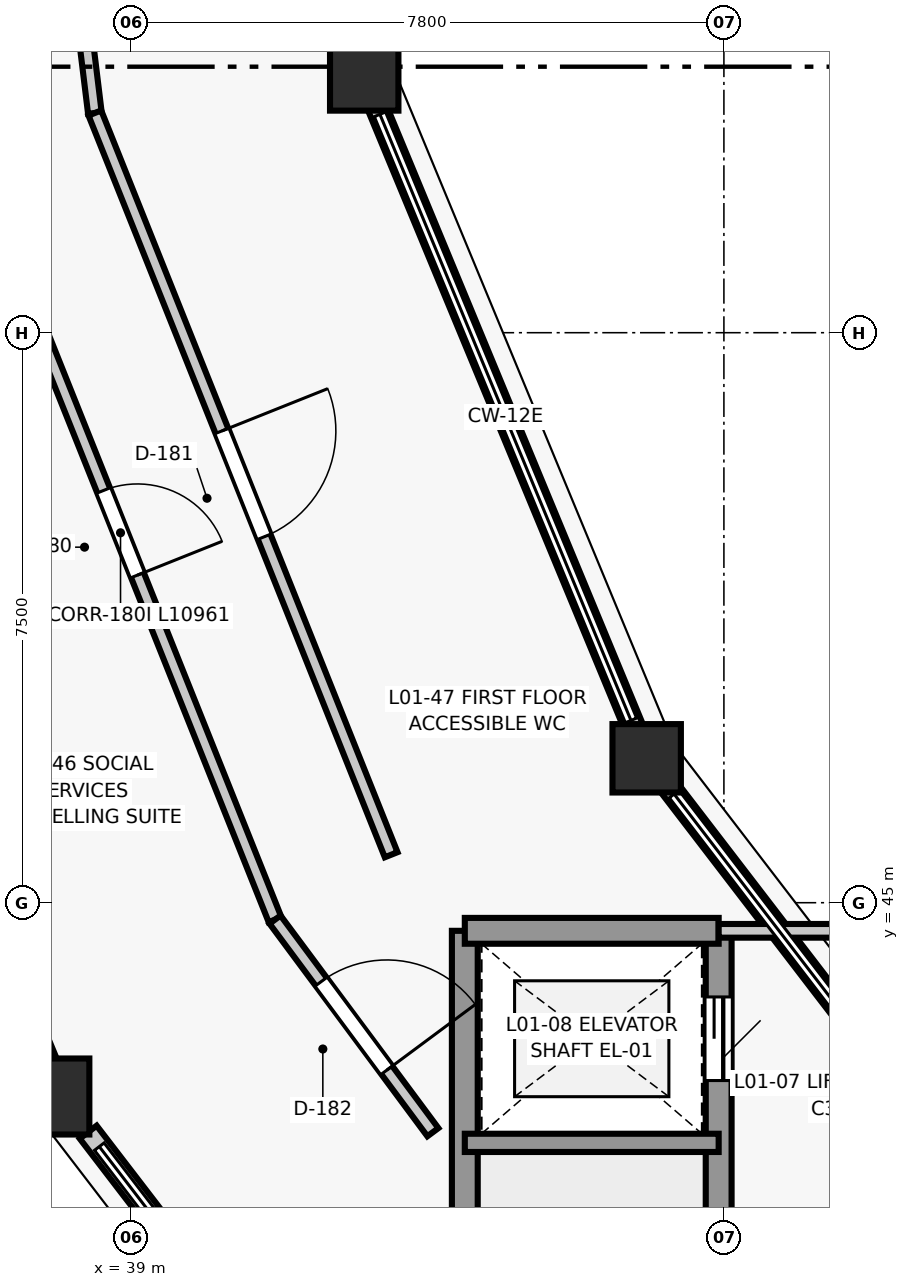
"""IFC4 building model, lengths in metres.
Left out: names, types, materials, properties, quantities, classifications, styles, units other than length and angle.
Written with IfcOpenShell. Run it as: python <this file> out.ifc"""

import sys

from ifc_helpers import new_model, si_unit, direction, frame, frame_2d, origin, origin_2d, place, context, subcontext, project, spatial, rectangle, circle, extrude, element, fill, save


model = new_model("IFC4")
c1 = context("Model", 3, precision=1e-05, world=origin(), true_north=direction((0.0, 1.0)))
c2 = subcontext(c1, "Body", "Model", "MODEL_VIEW")
j1 = project(units=[si_unit("LENGTHUNIT", "METRE"), si_unit("PLANEANGLEUNIT", "RADIAN")], contexts=[c1])
p1 = place(None, origin())
s1 = spatial("IfcSite", under=j1, at=p1, CompositionType="ELEMENT")
p2 = place(p1, origin())
s2 = spatial("IfcBuilding", under=s1, at=p2, CompositionType="ELEMENT")
p3 = place(p2, frame((0.0, 0.0, 4.5)))
s3 = spatial("IfcBuildingStorey", under=s2, at=p3, CompositionType="ELEMENT", Elevation=4.5)
for number, where, z_axis, x_axis in (
    (1, (42.068, 55.872, 0.0), (0.0, 0.0, 1.0), (1.0, 0.0, 0.0)),
    (2, (45.784, 46.9, 0.0), (0.0, 0.0, 1.0), (1.0, 0.0, 0.0)),
):
    element("IfcColumn", number, at=place(p3, frame(where, z_axis=z_axis, x_axis=x_axis)), inside=s3, PredefinedType="COLUMN", context=c2, shape_type="SweptSolid", body=[
        extrude(circle(Radius=0.45, at=origin_2d()), origin(), (0.0, 0.0, 1.0), 4.2),
    ])
p4 = place(p3, frame((38.076, 42.45, 0.0), z_axis=(0.0, 0.0, 1.0), x_axis=(1.0, 0.0, 0.0)))
e3 = element("IfcColumn", 3, at=p4, inside=s3, PredefinedType="COLUMN", context=c2, shape_type="SweptSolid", body=[
    extrude(rectangle(XDim=0.75, YDim=1.0, at=origin_2d()), origin(), (0.0, 0.0, 1.0), 4.2),
])
p5 = place(p3, frame((40.836, 65.225, 0.0), z_axis=(0.0, 0.0, 1.0), x_axis=(0.130549698469, -0.991441766434, 0.0)))
e4 = element("IfcWall", 4, at=p5, inside=s3, PredefinedType="STANDARD", context=c2, shape_type="SweptSolid", body=[
    extrude(rectangle(XDim=9.156, YDim=0.25, at=frame_2d((4.578, 0.0))), origin(), (0.0, 0.0, 1.0), 0.82),
])
p6 = place(p3, frame((37.879, 42.927, 0.0), z_axis=(0.0, 0.0, 1.0), x_axis=(-0.382695413149, 0.923874569817, 0.0)))
e5 = element("IfcWall", 5, at=p6, inside=s3, PredefinedType="STANDARD", context=c2, shape_type="SweptSolid", body=[
    extrude(rectangle(XDim=11.002, YDim=0.28, at=frame_2d((5.501, 0.0))), origin(), (0.0, 0.0, 1.0), 0.82),
])
p7 = place(p3, frame((42.182, 55.595, 0.0), z_axis=(0.0, 0.0, 1.0), x_axis=(0.382681519675, -0.923880324771, 0.0)))
e6 = element("IfcWall", 6, at=p7, inside=s3, PredefinedType="STANDARD", context=c2, shape_type="SweptSolid", body=[
    extrude(rectangle(XDim=9.112, YDim=0.25, at=frame_2d((4.556, 0.0))), origin(), (0.0, 0.0, 1.0), 0.82),
])
p8 = place(p3, frame((45.042, 33.371, 0.0), z_axis=(0.0, 0.0, 1.0), x_axis=(-0.608753590889, 0.79335935463, 0.0)))
e7 = element("IfcWall", 7, at=p8, inside=s3, PredefinedType="STANDARD", context=c2, shape_type="SweptSolid", body=[
    extrude(rectangle(XDim=10.852, YDim=0.28, at=frame_2d((5.426, 0.0))), origin(), (0.0, 0.0, 1.0), 0.82),
])
p9 = place(p3, frame((45.999, 46.62, 0.0), z_axis=(0.0, 0.0, 1.0), x_axis=(0.608769580289, -0.793347085527, 0.0)))
e8 = element("IfcWall", 8, at=p9, inside=s3, PredefinedType="STANDARD", context=c2, shape_type="SweptSolid", body=[
    extrude(rectangle(XDim=9.005, YDim=0.25, at=frame_2d((4.502, 0.0))), origin(), (0.0, 0.0, 1.0), 0.82),
])
p10 = place(p3, frame((46.731, 44.63, 0.0), z_axis=(0.0, 0.0, 1.0), x_axis=(0.0, -1.0, 0.0)))
e9 = element("IfcWall", 9, at=p10, inside=s3, PredefinedType="SHEAR", context=c2, shape_type="SweptSolid", body=[
    extrude(rectangle(XDim=9.73, YDim=0.34, at=frame_2d((4.865, 0.0))), origin(), (0.0, 0.0, 1.0), 4.2),
])
p11 = place(p10, frame((8.265, 0.0, 0.0)))
e10 = element("IfcOpeningElement", 10, at=p11, cuts=e9, PredefinedType="OPENING", context=c2, shape_type="SweptSolid", body=[
    extrude(rectangle(XDim=1.15, YDim=2.15, at=frame_2d((0.575, 1.075))), frame((0.0, 0.18, 0.0), z_axis=(0.0, -1.0, 0.0), x_axis=(1.0, 0.0, 0.0)), (0.0, 0.0, 1.0), 0.36),
])
p12 = place(p10, frame((0.87, 0.0, 0.0)))
e11 = element("IfcOpeningElement", 11, at=p12, cuts=e9, PredefinedType="OPENING", context=c2, shape_type="SweptSolid", body=[
    extrude(rectangle(XDim=1.1, YDim=2.15, at=frame_2d((0.55, 1.075))), frame((0.0, 0.18, 0.0), z_axis=(0.0, -1.0, 0.0), x_axis=(1.0, 0.0, 0.0)), (0.0, 0.0, 1.0), 0.36),
])
p13 = place(p3, frame((43.391, 34.9, 0.0), z_axis=(0.0, 0.0, 1.0), x_axis=(0.0, 1.0, 0.0)))
e12 = element("IfcWall", 12, at=p13, inside=s3, PredefinedType="SHEAR", context=c2, shape_type="SweptSolid", body=[
    extrude(rectangle(XDim=9.73, YDim=0.34, at=frame_2d((4.865, 0.0))), origin(), (0.0, 0.0, 1.0), 4.2),
])
p14 = place(p3, frame((43.391, 44.63, 0.0), z_axis=(0.0, 0.0, 1.0), x_axis=(1.0, 0.0, 0.0)))
e13 = element("IfcWall", 13, at=p14, inside=s3, PredefinedType="SHEAR", context=c2, shape_type="SweptSolid", body=[
    extrude(rectangle(XDim=3.34, YDim=0.34, at=frame_2d((1.67, 0.0))), origin(), (0.0, 0.0, 1.0), 4.2),
])
p15 = place(p3, frame((46.731, 41.84, 0.0), z_axis=(0.0, 0.0, 1.0), x_axis=(-1.0, 0.0, 0.0)))
e14 = element("IfcWall", 14, at=p15, inside=s3, PredefinedType="SHEAR", context=c2, shape_type="SweptSolid", body=[
    extrude(rectangle(XDim=3.34, YDim=0.24, at=frame_2d((1.67, 0.0))), origin(), (0.0, 0.0, 1.0), 4.2),
])
p16 = place(p3, frame((46.731, 44.63, 0.0), z_axis=(0.0, 0.0, 1.0), x_axis=(1.0, 0.0, 0.0)))
e15 = element("IfcWall", 15, at=p16, inside=s3, PredefinedType="PARTITIONING", context=c2, shape_type="SweptSolid", body=[
    extrude(rectangle(XDim=2.25, YDim=0.18, at=frame_2d((1.125, 0.0))), origin(), (0.0, 0.0, 1.0), 3.855),
])
p17 = place(p3, frame((37.763, 61.625, 0.0), z_axis=(0.0, 0.0, 1.0), x_axis=(0.12105344106, -0.992645991483, 0.0)))
e16 = element("IfcWall", 16, at=p17, inside=s3, PredefinedType="PARTITIONING", context=c2, shape_type="SweptSolid", body=[
    extrude(rectangle(XDim=6.28, YDim=0.18, at=frame_2d((3.14, 0.0))), origin(), (0.0, 0.0, 1.0), 3.855),
])
p18 = place(p17, frame((2.615, 0.0, 0.0)))
e17 = element("IfcOpeningElement", 17, at=p18, cuts=e16, PredefinedType="OPENING", context=c2, shape_type="SweptSolid", body=[
    extrude(rectangle(XDim=1.05, YDim=2.1, at=frame_2d((0.525, 1.05))), frame((0.0, 0.1, 0.0), z_axis=(0.0, -1.0, 0.0), x_axis=(1.0, 0.0, 0.0)), (0.0, 0.0, 1.0), 0.2),
])
p19 = place(p3, frame((36.829, 54.957, 0.0), z_axis=(0.0, 0.0, 1.0), x_axis=(0.370918279433, -0.928665510279, 0.0)))
e18 = element("IfcWall", 18, at=p19, inside=s3, PredefinedType="PARTITIONING", context=c2, shape_type="SweptSolid", body=[
    extrude(rectangle(XDim=10.961, YDim=0.18, at=frame_2d((5.48, 0.0))), origin(), (0.0, 0.0, 1.0), 3.855),
])
p20 = place(p19, frame((4.881, 0.0, 0.0)))
e19 = element("IfcOpeningElement", 19, at=p20, cuts=e18, PredefinedType="OPENING", context=c2, shape_type="SweptSolid", body=[
    extrude(rectangle(XDim=1.2, YDim=2.15, at=frame_2d((0.6, 1.075))), frame((0.0, 0.1, 0.0), z_axis=(0.0, -1.0, 0.0), x_axis=(1.0, 0.0, 0.0)), (0.0, 0.0, 1.0), 0.2),
])
p21 = place(p3, frame((38.524, 55.391, 0.0), z_axis=(0.0, 0.0, 1.0), x_axis=(0.370942047159, -0.92865601686, 0.0)))
e20 = element("IfcWall", 20, at=p21, inside=s3, PredefinedType="PARTITIONING", context=c2, shape_type="SweptSolid", body=[
    extrude(rectangle(XDim=10.51, YDim=0.18, at=frame_2d((5.255, 0.0))), origin(), (0.0, 0.0, 1.0), 3.855),
])
p22 = place(p21, frame((4.505, 0.0, 0.0)))
e21 = element("IfcOpeningElement", 21, at=p22, cuts=e20, PredefinedType="OPENING", context=c2, shape_type="SweptSolid", body=[
    extrude(rectangle(XDim=1.5, YDim=2.15, at=frame_2d((0.75, 1.075))), frame((0.0, 0.1, 0.0), z_axis=(0.0, -1.0, 0.0), x_axis=(1.0, 0.0, 0.0)), (0.0, 0.0, 1.0), 0.2),
])
p23 = place(p3, frame((40.894, 44.778, 0.0), z_axis=(0.0, 0.0, 1.0), x_axis=(0.59610205182, -0.802908677134, 0.0)))
e22 = element("IfcWall", 22, at=p23, inside=s3, PredefinedType="PARTITIONING", context=c2, shape_type="SweptSolid", body=[
    extrude(rectangle(XDim=3.484, YDim=0.18, at=frame_2d((1.742, 0.0))), origin(), (0.0, 0.0, 1.0), 3.855),
])
p24 = place(p23, frame((1.017, 0.0, 0.0)))
e23 = element("IfcOpeningElement", 23, at=p24, cuts=e22, PredefinedType="OPENING", context=c2, shape_type="SweptSolid", body=[
    extrude(rectangle(XDim=1.45, YDim=2.2, at=frame_2d((0.725, 1.1))), frame((0.0, 0.1, 0.0), z_axis=(0.0, -1.0, 0.0), x_axis=(1.0, 0.0, 0.0)), (0.0, 0.0, 1.0), 0.2),
])
p25 = place(p12, origin())
e24 = element("IfcDoor", 24, at=p25, inside=s3, OperationType="SLIDING_TO_LEFT", PredefinedType="DOOR", context=c2, shape_type="SweptSolid", body=[
    extrude(rectangle(XDim=1.1, YDim=2.15, at=frame_2d((0.55, 1.075))), frame((0.0, 0.025, 0.0), z_axis=(0.0, -1.0, 0.0), x_axis=(1.0, 0.0, 0.0)), (0.0, 0.0, 1.0), 0.05),
])
fill(e11, e24)
p26 = place(p20, origin())
e25 = element("IfcDoor", 25, at=p26, inside=s3, OperationType="SINGLE_SWING_RIGHT", PredefinedType="DOOR", context=c2, shape_type="SweptSolid", body=[
    extrude(rectangle(XDim=1.2, YDim=2.15, at=frame_2d((0.6, 1.075))), frame((0.0, 0.025, 0.0), z_axis=(0.0, -1.0, 0.0), x_axis=(1.0, 0.0, 0.0)), (0.0, 0.0, 1.0), 0.05),
])
fill(e19, e25)
p27 = place(p22, origin())
e26 = element("IfcDoor", 26, at=p27, inside=s3, OperationType="SINGLE_SWING_LEFT", PredefinedType="DOOR", context=c2, shape_type="SweptSolid", body=[
    extrude(rectangle(XDim=1.5, YDim=2.15, at=frame_2d((0.75, 1.075))), frame((0.0, 0.025, 0.0), z_axis=(0.0, -1.0, 0.0), x_axis=(1.0, 0.0, 0.0)), (0.0, 0.0, 1.0), 0.05),
])
fill(e21, e26)
p28 = place(p24, origin())
e27 = element("IfcDoor", 27, at=p28, inside=s3, OperationType="SINGLE_SWING_RIGHT", PredefinedType="DOOR", context=c2, shape_type="SweptSolid", body=[
    extrude(rectangle(XDim=1.45, YDim=2.2, at=frame_2d((0.725, 1.1))), frame((0.0, 0.025, 0.0), z_axis=(0.0, -1.0, 0.0), x_axis=(1.0, 0.0, 0.0)), (0.0, 0.0, 1.0), 0.05),
])
fill(e23, e27)
save(model, sys.argv[1])
